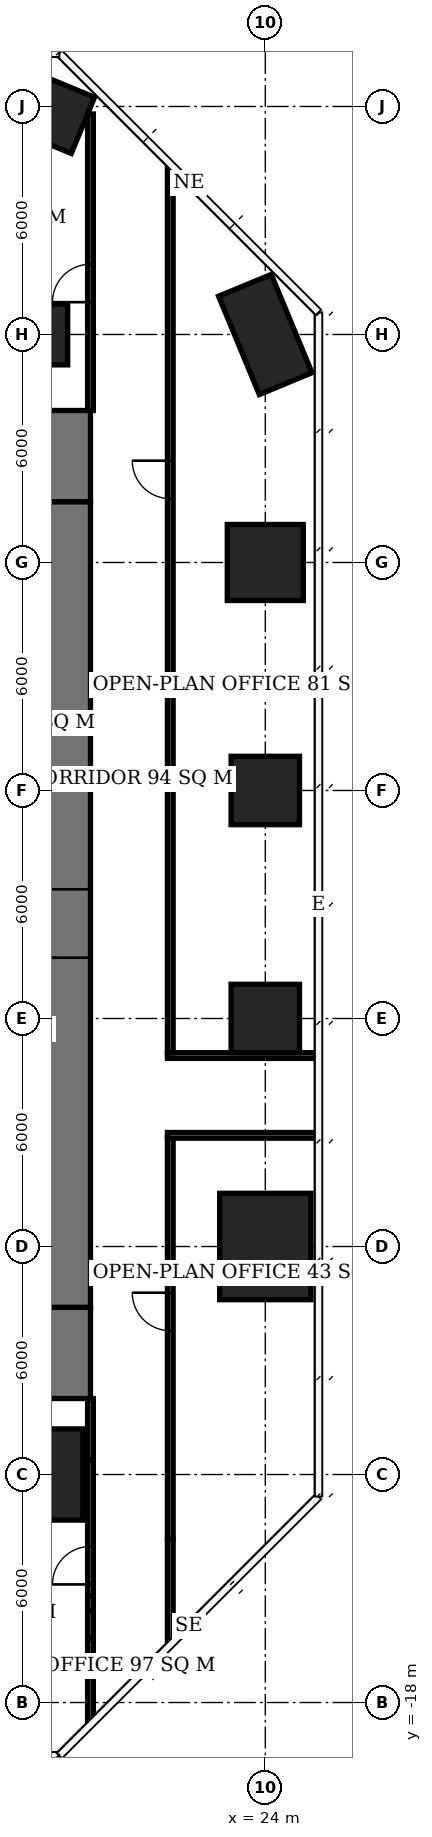
"""IFC4 building model, lengths in metres.
Left out: names, types, materials, properties, quantities, classifications, styles, units other than length and angle.
Written with IfcOpenShell. Run it as: python <this file> out.ifc"""

import sys

from ifc_helpers import new_model, si_unit, direction, frame, frame_2d, origin, origin_2d, place, context, subcontext, project, spatial, rectangle, extrude, element, fill, save


model = new_model("IFC4")
c1 = context("Model", 3, precision=1e-05, world=origin(), true_north=direction((0.0, 1.0)))
c2 = subcontext(c1, "Body", "Model", "MODEL_VIEW")
j1 = project(units=[si_unit("LENGTHUNIT", "METRE"), si_unit("PLANEANGLEUNIT", "RADIAN")], contexts=[c1])
p1 = place(None, origin())
s1 = spatial("IfcSite", under=j1, at=p1, CompositionType="ELEMENT")
p2 = place(p1, origin())
s2 = spatial("IfcBuilding", under=s1, at=p2, CompositionType="ELEMENT")
p3 = place(p2, frame((0.0, 0.0, 136.7)))
s3 = spatial("IfcBuildingStorey", under=s2, at=p3, CompositionType="ELEMENT", Elevation=136.7)
p4 = place(p3, frame((18.0, -12.0, 0.0), z_axis=(0.0, 0.0, 1.0), x_axis=(1.0, 0.0, 0.0)))
e1 = element("IfcColumn", 1, at=p4, inside=s3, PredefinedType="COLUMN", context=c2, shape_type="SweptSolid", body=[
    extrude(rectangle(XDim=2.4, YDim=2.4, at=origin_2d()), origin(), (0.0, 0.0, 1.0), 3.9),
])
p5 = place(p3, frame((18.0, 18.0, 0.0), z_axis=(0.0, 0.0, 1.0), x_axis=(1.0, 0.0, 0.0)))
e2 = element("IfcColumn", 2, at=p5, inside=s3, PredefinedType="COLUMN", context=c2, shape_type="SweptSolid", body=[
    extrude(rectangle(XDim=1.6, YDim=1.6, at=origin_2d()), origin(), (0.0, 0.0, 1.0), 3.9),
])
p6 = place(p3, frame((18.0, 24.0, 0.0), z_axis=(0.0, 0.0, 1.0), x_axis=(0.923879532511, -0.382683432365, 0.0)))
e3 = element("IfcColumn", 3, at=p6, inside=s3, PredefinedType="COLUMN", context=c2, shape_type="SweptSolid", body=[
    extrude(rectangle(XDim=2.6, YDim=1.6, at=origin_2d()), origin(), (0.0, 0.0, 1.0), 3.9),
])
p7 = place(p3, frame((24.0, -6.0, 0.0), z_axis=(0.0, 0.0, 1.0), x_axis=(0.0, 1.0, 0.0)))
e4 = element("IfcColumn", 4, at=p7, inside=s3, PredefinedType="COLUMN", context=c2, shape_type="SweptSolid", body=[
    extrude(rectangle(XDim=2.8, YDim=2.4, at=origin_2d()), origin(), (0.0, 0.0, 1.0), 3.9),
])
for number, where, z_axis, x_axis in (
    (5, (24.0, 0.0, 0.0), (0.0, 0.0, 1.0), (1.0, 0.0, 0.0)),
    (6, (24.0, 6.0, 0.0), (0.0, 0.0, 1.0), (1.0, 0.0, 0.0)),
):
    element("IfcColumn", number, at=place(p3, frame(where, z_axis=z_axis, x_axis=x_axis)), inside=s3, PredefinedType="COLUMN", context=c2, shape_type="SweptSolid", body=[
        extrude(rectangle(XDim=1.8, YDim=1.8, at=origin_2d()), origin(), (0.0, 0.0, 1.0), 3.9),
    ])
p8 = place(p3, frame((24.0, 12.0, 0.0), z_axis=(0.0, 0.0, 1.0), x_axis=(1.0, 0.0, 0.0)))
e7 = element("IfcColumn", 7, at=p8, inside=s3, PredefinedType="COLUMN", context=c2, shape_type="SweptSolid", body=[
    extrude(rectangle(XDim=2.0, YDim=2.0, at=origin_2d()), origin(), (0.0, 0.0, 1.0), 3.9),
])
p9 = place(p3, frame((24.0, 18.0, 0.0), z_axis=(0.0, 0.0, 1.0), x_axis=(0.382683432365, -0.923879532511, 0.0)))
e8 = element("IfcColumn", 8, at=p9, inside=s3, PredefinedType="COLUMN", context=c2, shape_type="SweptSolid", body=[
    extrude(rectangle(XDim=2.8, YDim=1.5, at=origin_2d()), origin(), (0.0, 0.0, 1.0), 3.9),
])
p10 = place(p3, frame((18.5, -7.6, 0.0), z_axis=(0.0, 0.0, 1.0), x_axis=(0.0, 1.0, 0.0)))
e9 = element("IfcWall", 9, at=p10, inside=s3, PredefinedType="SHEAR", context=c2, shape_type="SweptSolid", body=[
    extrude(rectangle(XDim=21.2, YDim=1.8, at=frame_2d((10.6, 0.0))), origin(), (0.0, 0.0, 1.0), 3.9),
])
p11 = place(p10, frame((9.2, 0.0, 0.0)))
e10 = element("IfcOpeningElement", 10, at=p11, cuts=e9, PredefinedType="OPENING", context=c2, shape_type="SweptSolid", body=[
    extrude(rectangle(XDim=1.8, YDim=2.4, at=frame_2d((0.9, 1.2))), frame((0.0, 0.91, 0.0), z_axis=(0.0, -1.0, 0.0), x_axis=(1.0, 0.0, 0.0)), (0.0, 0.0, 1.0), 1.82),
])
for number, where, z_axis, x_axis in (
    (11, (18.5, -10.0, 0.0), (0.0, 0.0, 1.0), (0.0, 1.0, 0.0)),
    (12, (18.5, 13.6, 0.0), (0.0, 0.0, 1.0), (0.0, 1.0, 0.0)),
):
    element("IfcWall", number, at=place(p3, frame(where, z_axis=z_axis, x_axis=x_axis)), inside=s3, PredefinedType="SHEAR", context=c2, shape_type="SweptSolid", body=[
        extrude(rectangle(XDim=2.4, YDim=1.8, at=frame_2d((1.2, 0.0))), origin(), (0.0, 0.0, 1.0), 3.9),
    ])
p12 = place(p3, frame((19.4, -18.489, 0.0), z_axis=(0.0, 0.0, 1.0), x_axis=(0.0, 1.0, 0.0)))
e13 = element("IfcWall", 13, at=p12, inside=s3, PredefinedType="PARTITIONING", context=c2, shape_type="SweptSolid", body=[
    extrude(rectangle(XDim=2.179, YDim=0.15, at=frame_2d((1.089, 0.0))), origin(), (0.0, 0.0, 1.0), 3.65),
])
p13 = place(p3, frame((19.4, -16.31, 0.0), z_axis=(0.0, 0.0, 1.0), x_axis=(0.0, 1.0, 0.0)))
e14 = element("IfcWall", 14, at=p13, inside=s3, PredefinedType="PARTITIONING", context=c2, shape_type="SweptSolid", body=[
    extrude(rectangle(XDim=0.72, YDim=0.15, at=frame_2d((0.36, 0.0))), origin(), (0.0, 0.0, 1.0), 2.65),
])
p14 = place(p3, frame((19.4, -15.59, 0.0), z_axis=(0.0, 0.0, 1.0), x_axis=(0.0, 1.0, 0.0)))
e15 = element("IfcWall", 15, at=p14, inside=s3, PredefinedType="PARTITIONING", context=c2, shape_type="SweptSolid", body=[
    extrude(rectangle(XDim=0.398, YDim=0.15, at=frame_2d((0.199, 0.0))), origin(), (0.0, 0.0, 1.0), 3.65),
])
p15 = place(p3, frame((19.4, -15.192, 0.0), z_axis=(0.0, 0.0, 1.0), x_axis=(0.0, 1.0, 0.0)))
e16 = element("IfcWall", 16, at=p15, inside=s3, PredefinedType="PARTITIONING", context=c2, shape_type="SweptSolid", body=[
    extrude(rectangle(XDim=3.584, YDim=0.15, at=frame_2d((1.792, 0.0))), origin(), (0.0, 0.0, 1.0), 2.65),
])
p16 = place(p15, frame((0.3, 0.0, 0.0)))
e17 = element("IfcOpeningElement", 17, at=p16, cuts=e16, PredefinedType="OPENING", context=c2, shape_type="SweptSolid", body=[
    extrude(rectangle(XDim=1.0, YDim=2.1, at=frame_2d((0.5, 1.05))), frame((0.0, 0.085, 0.0), z_axis=(0.0, -1.0, 0.0), x_axis=(1.0, 0.0, 0.0)), (0.0, 0.0, 1.0), 0.17),
])
p17 = place(p3, frame((19.4, -11.608, 0.0), z_axis=(0.0, 0.0, 1.0), x_axis=(0.0, 1.0, 0.0)))
e18 = element("IfcWall", 18, at=p17, inside=s3, PredefinedType="PARTITIONING", context=c2, shape_type="SweptSolid", body=[
    extrude(rectangle(XDim=1.608, YDim=0.15, at=frame_2d((0.804, 0.0))), origin(), (0.0, 0.0, 1.0), 3.65),
])
p18 = place(p3, frame((19.4, 16.0, 0.0), z_axis=(0.0, 0.0, 1.0), x_axis=(0.0, 1.0, 0.0)))
e19 = element("IfcWall", 19, at=p18, inside=s3, PredefinedType="PARTITIONING", context=c2, shape_type="SweptSolid", body=[
    extrude(rectangle(XDim=7.802, YDim=0.15, at=frame_2d((3.901, 0.0))), origin(), (0.0, 0.0, 1.0), 3.65),
])
p19 = place(p18, frame((2.85, 0.0, 0.0)))
e20 = element("IfcOpeningElement", 20, at=p19, cuts=e19, PredefinedType="OPENING", context=c2, shape_type="SweptSolid", body=[
    extrude(rectangle(XDim=1.0, YDim=2.1, at=frame_2d((0.5, 1.05))), frame((0.0, 0.085, 0.0), z_axis=(0.0, -1.0, 0.0), x_axis=(1.0, 0.0, 0.0)), (0.0, 0.0, 1.0), 0.17),
])
p20 = place(p3, frame((21.5, -16.388, 0.0), z_axis=(0.0, 0.0, 1.0), x_axis=(0.0, 1.0, 0.0)))
e21 = element("IfcWall", 21, at=p20, inside=s3, PredefinedType="PARTITIONING", context=c2, shape_type="SweptSolid", body=[
    extrude(rectangle(XDim=2.68, YDim=0.15, at=frame_2d((1.34, 0.0))), origin(), (0.0, 0.0, 1.0), 2.65),
])
p21 = place(p3, frame((21.5, -13.708, 0.0), z_axis=(0.0, 0.0, 1.0), x_axis=(0.0, 1.0, 0.0)))
e22 = element("IfcWall", 22, at=p21, inside=s3, PredefinedType="PARTITIONING", context=c2, shape_type="SweptSolid", body=[
    extrude(rectangle(XDim=10.558, YDim=0.15, at=frame_2d((5.279, 0.0))), origin(), (0.0, 0.0, 1.0), 3.65),
])
p22 = place(p21, frame((5.492, 0.0, 0.0)))
e23 = element("IfcOpeningElement", 23, at=p22, cuts=e22, PredefinedType="OPENING", context=c2, shape_type="SweptSolid", body=[
    extrude(rectangle(XDim=1.0, YDim=2.1, at=frame_2d((0.5, 1.05))), frame((0.0, 0.085, 0.0), z_axis=(0.0, -1.0, 0.0), x_axis=(1.0, 0.0, 0.0)), (0.0, 0.0, 1.0), 0.17),
])
p23 = place(p3, frame((21.425, -3.075, 0.0), z_axis=(0.0, 0.0, 1.0), x_axis=(1.0, 0.0, 0.0)))
e24 = element("IfcWall", 24, at=p23, inside=s3, PredefinedType="PARTITIONING", context=c2, shape_type="SweptSolid", body=[
    extrude(rectangle(XDim=3.975, YDim=0.15, at=frame_2d((1.987, 0.0))), origin(), (0.0, 0.0, 1.0), 3.65),
])
p24 = place(p3, frame((21.5, -0.9, 0.0), z_axis=(0.0, 0.0, 1.0), x_axis=(0.0, 1.0, 0.0)))
e25 = element("IfcWall", 25, at=p24, inside=s3, PredefinedType="PARTITIONING", context=c2, shape_type="SweptSolid", body=[
    extrude(rectangle(XDim=23.288, YDim=0.15, at=frame_2d((11.644, 0.0))), origin(), (0.0, 0.0, 1.0), 3.65),
])
p25 = place(p24, frame((14.579, 0.0, 0.0)))
e26 = element("IfcOpeningElement", 26, at=p25, cuts=e25, PredefinedType="OPENING", context=c2, shape_type="SweptSolid", body=[
    extrude(rectangle(XDim=1.0, YDim=2.1, at=frame_2d((0.5, 1.05))), frame((0.0, 0.085, 0.0), z_axis=(0.0, -1.0, 0.0), x_axis=(1.0, 0.0, 0.0)), (0.0, 0.0, 1.0), 0.17),
])
p26 = place(p3, frame((21.425, -0.975, 0.0), z_axis=(0.0, 0.0, 1.0), x_axis=(1.0, 0.0, 0.0)))
e27 = element("IfcWall", 27, at=p26, inside=s3, PredefinedType="PARTITIONING", context=c2, shape_type="SweptSolid", body=[
    extrude(rectangle(XDim=3.975, YDim=0.15, at=frame_2d((1.987, 0.0))), origin(), (0.0, 0.0, 1.0), 3.65),
])
p27 = place(p11, origin())
e28 = element("IfcDoor", 28, at=p27, inside=s3, OperationType="DOUBLE_DOOR_SINGLE_SWING", PredefinedType="DOOR", context=c2, shape_type="SweptSolid", body=[
    extrude(rectangle(XDim=1.8, YDim=2.4, at=frame_2d((0.9, 1.2))), frame((0.0, 0.025, 0.0), z_axis=(0.0, -1.0, 0.0), x_axis=(1.0, 0.0, 0.0)), (0.0, 0.0, 1.0), 0.05),
])
fill(e10, e28)
p28 = place(p16, origin())
e29 = element("IfcDoor", 29, at=p28, inside=s3, OperationType="SINGLE_SWING_LEFT", PredefinedType="DOOR", context=c2, shape_type="SweptSolid", body=[
    extrude(rectangle(XDim=1.0, YDim=2.1, at=frame_2d((0.5, 1.05))), frame((0.0, 0.025, 0.0), z_axis=(0.0, -1.0, 0.0), x_axis=(1.0, 0.0, 0.0)), (0.0, 0.0, 1.0), 0.05),
])
fill(e17, e29)
p29 = place(p22, origin())
e30 = element("IfcDoor", 30, at=p29, inside=s3, OperationType="SINGLE_SWING_RIGHT", PredefinedType="DOOR", context=c2, shape_type="SweptSolid", body=[
    extrude(rectangle(XDim=1.0, YDim=2.1, at=frame_2d((0.5, 1.05))), frame((0.0, 0.025, 0.0), z_axis=(0.0, -1.0, 0.0), x_axis=(1.0, 0.0, 0.0)), (0.0, 0.0, 1.0), 0.05),
])
fill(e23, e30)
p30 = place(p25, origin())
e31 = element("IfcDoor", 31, at=p30, inside=s3, OperationType="SINGLE_SWING_RIGHT", PredefinedType="DOOR", context=c2, shape_type="SweptSolid", body=[
    extrude(rectangle(XDim=1.0, YDim=2.1, at=frame_2d((0.5, 1.05))), frame((0.0, 0.025, 0.0), z_axis=(0.0, -1.0, 0.0), x_axis=(1.0, 0.0, 0.0)), (0.0, 0.0, 1.0), 0.05),
])
fill(e26, e31)
p31 = place(p19, origin())
e32 = element("IfcDoor", 32, at=p31, inside=s3, OperationType="SINGLE_SWING_LEFT", PredefinedType="DOOR", context=c2, shape_type="SweptSolid", body=[
    extrude(rectangle(XDim=1.0, YDim=2.1, at=frame_2d((0.5, 1.05))), frame((0.0, 0.025, 0.0), z_axis=(0.0, -1.0, 0.0), x_axis=(1.0, 0.0, 0.0)), (0.0, 0.0, 1.0), 0.05),
])
fill(e20, e32)
save(model, sys.argv[1])
